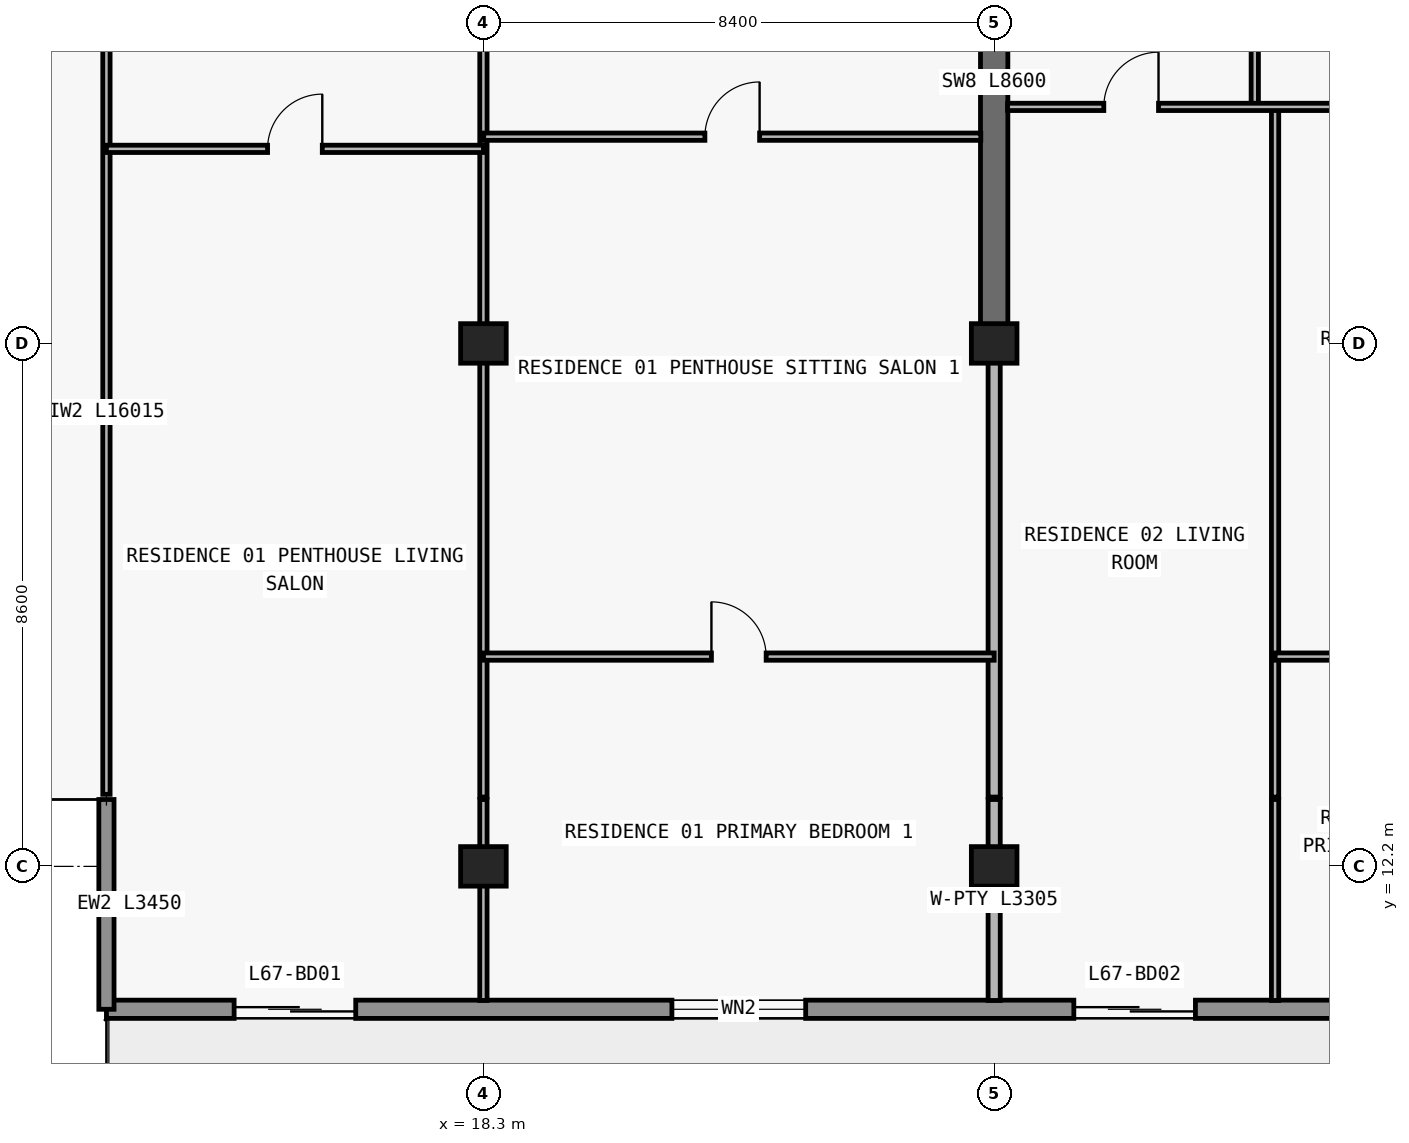
"""IFC4 building model, lengths in metres.
Left out: names, types, materials, properties, quantities, classifications, styles, units other than length and angle.
Written with IfcOpenShell. Run it as: python <this file> out.ifc"""

import sys

from ifc_helpers import new_model, si_unit, direction, frame, frame_2d, origin, origin_2d, place, context, subcontext, project, spatial, rectangle, extrude, element, fill, save


model = new_model("IFC4")
c1 = context("Model", 3, precision=1e-05, world=origin(), true_north=direction((0.0, 1.0)))
c2 = subcontext(c1, "Body", "Model", "MODEL_VIEW")
j1 = project(units=[si_unit("LENGTHUNIT", "METRE"), si_unit("PLANEANGLEUNIT", "RADIAN")], contexts=[c1])
p1 = place(None, origin())
s1 = spatial("IfcSite", under=j1, at=p1, CompositionType="ELEMENT")
p2 = place(p1, origin())
s2 = spatial("IfcBuilding", under=s1, at=p2, CompositionType="ELEMENT")
p3 = place(p2, frame((0.0, 0.0, 239.7)))
s3 = spatial("IfcBuildingStorey", under=s2, at=p3, CompositionType="ELEMENT", Elevation=239.7)
for number, where, z_axis, x_axis in (
    (1, (18.3, 12.2, 0.0), (0.0, 0.0, 1.0), (1.0, 0.0, 0.0)),
    (2, (26.7, 12.2, 0.0), (0.0, 0.0, 1.0), (1.0, 0.0, 0.0)),
    (3, (18.3, 20.8, 0.0), (0.0, 0.0, 1.0), (1.0, 0.0, 0.0)),
    (4, (26.7, 20.8, 0.0), (0.0, 0.0, 1.0), (1.0, 0.0, 0.0)),
):
    element("IfcColumn", number, at=place(p3, frame(where, z_axis=z_axis, x_axis=x_axis)), inside=s3, PredefinedType="COLUMN", context=c2, shape_type="SweptSolid", body=[
        extrude(rectangle(XDim=0.75, YDim=0.65, at=origin_2d()), origin(), (0.0, 0.0, 1.0), 3.05),
    ])
p4 = place(p3, frame((26.7, 20.8, 0.0), z_axis=(0.0, 0.0, 1.0), x_axis=(0.0, 1.0, 0.0)))
e5 = element("IfcWall", 5, at=p4, inside=s3, PredefinedType="SHEAR", context=c2, shape_type="SweptSolid", body=[
    extrude(rectangle(XDim=8.6, YDim=0.45, at=frame_2d((4.3, 0.0))), origin(), (0.0, 0.0, 1.0), 3.05),
])
p5 = place(p3, frame((65.7, 9.85, 0.0), z_axis=(0.0, 0.0, 1.0), x_axis=(-1.0, 0.0, 0.0)))
e6 = element("IfcWall", 6, at=p5, inside=s3, PredefinedType="STANDARD", context=c2, shape_type="SweptSolid", body=[
    extrude(rectangle(XDim=53.6, YDim=0.3, at=frame_2d((26.8, 0.0))), origin(), (0.0, 0.0, 1.0), 3.05),
])
p6 = place(p5, frame((49.5, 0.0, 0.0)))
e7 = element("IfcOpeningElement", 7, at=p6, cuts=e6, PredefinedType="OPENING", context=c2, shape_type="SweptSolid", body=[
    extrude(rectangle(XDim=2.0, YDim=2.3, at=frame_2d((1.0, 1.15))), frame((0.0, 0.16, 0.0), z_axis=(0.0, -1.0, 0.0), x_axis=(1.0, 0.0, 0.0)), (0.0, 0.0, 1.0), 0.32),
])
p7 = place(p5, frame((42.1, 0.0, 0.85)))
e8 = element("IfcOpeningElement", 8, at=p7, cuts=e6, PredefinedType="OPENING", context=c2, shape_type="SweptSolid", body=[
    extrude(rectangle(XDim=2.2, YDim=1.55, at=frame_2d((1.1, 0.775))), frame((0.0, 0.16, 0.0), z_axis=(0.0, -1.0, 0.0), x_axis=(1.0, 0.0, 0.0)), (0.0, 0.0, 1.0), 0.32),
])
p8 = place(p5, frame((35.69, 0.0, 0.0)))
e9 = element("IfcOpeningElement", 9, at=p8, cuts=e6, PredefinedType="OPENING", context=c2, shape_type="SweptSolid", body=[
    extrude(rectangle(XDim=2.0, YDim=2.3, at=frame_2d((1.0, 1.15))), frame((0.0, 0.16, 0.0), z_axis=(0.0, -1.0, 0.0), x_axis=(1.0, 0.0, 0.0)), (0.0, 0.0, 1.0), 0.32),
])
p9 = place(p5, frame((31.59, 0.0, 0.85)))
e10 = element("IfcOpeningElement", 10, at=p9, cuts=e6, PredefinedType="OPENING", context=c2, shape_type="SweptSolid", body=[
    extrude(rectangle(XDim=1.8, YDim=1.55, at=frame_2d((0.9, 0.775))), frame((0.0, 0.16, 0.0), z_axis=(0.0, -1.0, 0.0), x_axis=(1.0, 0.0, 0.0)), (0.0, 0.0, 1.0), 0.32),
])
p10 = place(p5, frame((23.914, 0.0, 0.85)))
e11 = element("IfcOpeningElement", 11, at=p10, cuts=e6, PredefinedType="OPENING", context=c2, shape_type="SweptSolid", body=[
    extrude(rectangle(XDim=2.2, YDim=1.55, at=frame_2d((1.1, 0.775))), frame((0.0, 0.16, 0.0), z_axis=(0.0, -1.0, 0.0), x_axis=(1.0, 0.0, 0.0)), (0.0, 0.0, 1.0), 0.32),
])
p11 = place(p5, frame((19.69, 0.0, 0.0)))
e12 = element("IfcOpeningElement", 12, at=p11, cuts=e6, PredefinedType="OPENING", context=c2, shape_type="SweptSolid", body=[
    extrude(rectangle(XDim=2.0, YDim=2.3, at=frame_2d((1.0, 1.15))), frame((0.0, 0.16, 0.0), z_axis=(0.0, -1.0, 0.0), x_axis=(1.0, 0.0, 0.0)), (0.0, 0.0, 1.0), 0.32),
])
p12 = place(p5, frame((15.59, 0.0, 0.85)))
e13 = element("IfcOpeningElement", 13, at=p12, cuts=e6, PredefinedType="OPENING", context=c2, shape_type="SweptSolid", body=[
    extrude(rectangle(XDim=1.8, YDim=1.55, at=frame_2d((0.9, 0.775))), frame((0.0, 0.16, 0.0), z_axis=(0.0, -1.0, 0.0), x_axis=(1.0, 0.0, 0.0)), (0.0, 0.0, 1.0), 0.32),
])
p13 = place(p5, frame((11.69, 0.0, 0.0)))
e14 = element("IfcOpeningElement", 14, at=p13, cuts=e6, PredefinedType="OPENING", context=c2, shape_type="SweptSolid", body=[
    extrude(rectangle(XDim=2.0, YDim=2.3, at=frame_2d((1.0, 1.15))), frame((0.0, 0.16, 0.0), z_axis=(0.0, -1.0, 0.0), x_axis=(1.0, 0.0, 0.0)), (0.0, 0.0, 1.0), 0.32),
])
p14 = place(p5, frame((7.01, 0.0, 0.65)))
e15 = element("IfcOpeningElement", 15, at=p14, cuts=e6, PredefinedType="OPENING", context=c2, shape_type="SweptSolid", body=[
    extrude(rectangle(XDim=2.6, YDim=1.85, at=frame_2d((1.3, 0.925))), frame((0.0, 0.16, 0.0), z_axis=(0.0, -1.0, 0.0), x_axis=(1.0, 0.0, 0.0)), (0.0, 0.0, 1.0), 0.32),
])
p15 = place(p5, frame((2.0, 0.0, 0.85)))
e16 = element("IfcOpeningElement", 16, at=p15, cuts=e6, PredefinedType="OPENING", context=c2, shape_type="SweptSolid", body=[
    extrude(rectangle(XDim=2.2, YDim=1.55, at=frame_2d((1.1, 0.775))), frame((0.0, 0.16, 0.0), z_axis=(0.0, -1.0, 0.0), x_axis=(1.0, 0.0, 0.0)), (0.0, 0.0, 1.0), 0.32),
])
p16 = place(p3, frame((12.1, 13.3, 0.0), z_axis=(0.0, 0.0, 1.0), x_axis=(0.0, -1.0, 0.0)))
e17 = element("IfcWall", 17, at=p16, inside=s3, PredefinedType="ELEMENTEDWALL", context=c2, shape_type="SweptSolid", body=[
    extrude(rectangle(XDim=3.45, YDim=0.25, at=frame_2d((1.725, 0.0))), origin(), (0.0, 0.0, 1.0), 3.05),
])
p17 = place(p3, frame((12.1, 13.385, 0.0), z_axis=(0.0, 0.0, 1.0), x_axis=(0.0, 1.0, 0.0)))
e18 = element("IfcWall", 18, at=p17, inside=s3, PredefinedType="PARTITIONING", context=c2, shape_type="SweptSolid", body=[
    extrude(rectangle(XDim=16.015, YDim=0.12, at=frame_2d((8.007, 0.0))), origin(), (0.0, 0.0, 1.0), 3.05),
])
p18 = place(p17, frame((12.565, 0.0, 0.0)))
e19 = element("IfcOpeningElement", 19, at=p18, cuts=e18, PredefinedType="OPENING", context=c2, shape_type="SweptSolid", body=[
    extrude(rectangle(XDim=0.9, YDim=2.15, at=frame_2d((0.45, 1.075))), frame((0.0, 0.07, 0.0), z_axis=(0.0, -1.0, 0.0), x_axis=(1.0, 0.0, 0.0)), (0.0, 0.0, 1.0), 0.14),
])
p19 = place(p3, frame((18.3, 9.995, 0.0), z_axis=(0.0, 0.0, 1.0), x_axis=(0.0, 1.0, 0.0)))
e20 = element("IfcWall", 20, at=p19, inside=s3, PredefinedType="PARTITIONING", context=c2, shape_type="SweptSolid", body=[
    extrude(rectangle(XDim=3.305, YDim=0.12, at=frame_2d((1.652, 0.0))), origin(), (0.0, 0.0, 1.0), 2.263),
])
p20 = place(p3, frame((18.3, 13.34, 0.0), z_axis=(0.0, 0.0, 1.0), x_axis=(0.0, 1.0, 0.0)))
e21 = element("IfcWall", 21, at=p20, inside=s3, PredefinedType="PARTITIONING", context=c2, shape_type="SweptSolid", body=[
    extrude(rectangle(XDim=16.06, YDim=0.12, at=frame_2d((8.03, 0.0))), origin(), (0.0, 0.0, 1.0), 2.263),
])
p21 = place(p20, frame((12.61, 0.0, 0.0)))
e22 = element("IfcOpeningElement", 22, at=p21, cuts=e21, PredefinedType="OPENING", context=c2, shape_type="SweptSolid", body=[
    extrude(rectangle(XDim=0.9, YDim=2.15, at=frame_2d((0.45, 1.075))), frame((0.0, 0.07, 0.0), z_axis=(0.0, -1.0, 0.0), x_axis=(1.0, 0.0, 0.0)), (0.0, 0.0, 1.0), 0.14),
])
p22 = place(p3, frame((26.7, 9.995, 0.0), z_axis=(0.0, 0.0, 1.0), x_axis=(0.0, 1.0, 0.0)))
e23 = element("IfcWall", 23, at=p22, inside=s3, PredefinedType="PARTITIONING", context=c2, shape_type="SweptSolid", body=[
    extrude(rectangle(XDim=3.305, YDim=0.2, at=frame_2d((1.652, 0.0))), origin(), (0.0, 0.0, 1.0), 2.263),
])
p23 = place(p3, frame((26.7, 13.34, 0.0), z_axis=(0.0, 0.0, 1.0), x_axis=(0.0, 1.0, 0.0)))
e24 = element("IfcWall", 24, at=p23, inside=s3, PredefinedType="PARTITIONING", context=c2, shape_type="SweptSolid", body=[
    extrude(rectangle(XDim=7.455, YDim=0.2, at=frame_2d((3.728, 0.0))), origin(), (0.0, 0.0, 1.0), 2.263),
])
p24 = place(p3, frame((30.986, 24.69, 0.0), z_axis=(0.0, 0.0, 1.0), x_axis=(0.0, 1.0, 0.0)))
e25 = element("IfcWall", 25, at=p24, inside=s3, PredefinedType="PARTITIONING", context=c2, shape_type="SweptSolid", body=[
    extrude(rectangle(XDim=4.71, YDim=0.12, at=frame_2d((2.355, 0.0))), origin(), (0.0, 0.0, 1.0), 2.629),
])
p25 = place(p24, frame((1.905, 0.0, 0.0)))
e26 = element("IfcOpeningElement", 26, at=p25, cuts=e25, PredefinedType="OPENING", context=c2, shape_type="SweptSolid", body=[
    extrude(rectangle(XDim=0.9, YDim=2.15, at=frame_2d((0.45, 1.075))), frame((0.0, 0.07, 0.0), z_axis=(0.0, -1.0, 0.0), x_axis=(1.0, 0.0, 0.0)), (0.0, 0.0, 1.0), 0.14),
])
p26 = place(p3, frame((31.32, 9.995, 0.0), z_axis=(0.0, 0.0, 1.0), x_axis=(0.0, 1.0, 0.0)))
e27 = element("IfcWall", 27, at=p26, inside=s3, PredefinedType="PARTITIONING", context=c2, shape_type="SweptSolid", body=[
    extrude(rectangle(XDim=3.305, YDim=0.12, at=frame_2d((1.652, 0.0))), origin(), (0.0, 0.0, 1.0), 3.05),
])
p27 = place(p3, frame((31.32, 13.34, 0.0), z_axis=(0.0, 0.0, 1.0), x_axis=(0.0, 1.0, 0.0)))
e28 = element("IfcWall", 28, at=p27, inside=s3, PredefinedType="PARTITIONING", context=c2, shape_type="SweptSolid", body=[
    extrude(rectangle(XDim=11.35, YDim=0.12, at=frame_2d((5.675, 0.0))), origin(), (0.0, 0.0, 1.0), 3.05),
])
p28 = place(p3, frame((18.3, 15.65, 0.0), z_axis=(0.0, 0.0, 1.0), x_axis=(1.0, 0.0, 0.0)))
e29 = element("IfcWall", 29, at=p28, inside=s3, PredefinedType="PARTITIONING", context=c2, shape_type="SweptSolid", body=[
    extrude(rectangle(XDim=8.4, YDim=0.12, at=frame_2d((4.2, 0.0))), origin(), (0.0, 0.0, 1.0), 3.05),
])
p29 = place(p28, frame((3.75, 0.0, 0.0)))
e30 = element("IfcOpeningElement", 30, at=p29, cuts=e29, PredefinedType="OPENING", context=c2, shape_type="SweptSolid", body=[
    extrude(rectangle(XDim=0.9, YDim=2.15, at=frame_2d((0.45, 1.075))), frame((0.0, 0.07, 0.0), z_axis=(0.0, -1.0, 0.0), x_axis=(1.0, 0.0, 0.0)), (0.0, 0.0, 1.0), 0.14),
])
p30 = place(p3, frame((31.32, 15.65, 0.0), z_axis=(0.0, 0.0, 1.0), x_axis=(1.0, 0.0, 0.0)))
e31 = element("IfcWall", 31, at=p30, inside=s3, PredefinedType="PARTITIONING", context=c2, shape_type="SweptSolid", body=[
    extrude(rectangle(XDim=3.78, YDim=0.12, at=frame_2d((1.89, 0.0))), origin(), (0.0, 0.0, 1.0), 3.05),
])
p31 = place(p30, frame((1.44, 0.0, 0.0)))
e32 = element("IfcOpeningElement", 32, at=p31, cuts=e31, PredefinedType="OPENING", context=c2, shape_type="SweptSolid", body=[
    extrude(rectangle(XDim=0.9, YDim=2.15, at=frame_2d((0.45, 1.075))), frame((0.0, 0.07, 0.0), z_axis=(0.0, -1.0, 0.0), x_axis=(1.0, 0.0, 0.0)), (0.0, 0.0, 1.0), 0.14),
])
p32 = place(p3, frame((12.1, 24.0, 0.0), z_axis=(0.0, 0.0, 1.0), x_axis=(1.0, 0.0, 0.0)))
e33 = element("IfcWall", 33, at=p32, inside=s3, PredefinedType="PARTITIONING", context=c2, shape_type="SweptSolid", body=[
    extrude(rectangle(XDim=6.2, YDim=0.12, at=frame_2d((3.1, 0.0))), origin(), (0.0, 0.0, 1.0), 3.05),
])
p33 = place(p32, frame((2.65, 0.0, 0.0)))
e34 = element("IfcOpeningElement", 34, at=p33, cuts=e33, PredefinedType="OPENING", context=c2, shape_type="SweptSolid", body=[
    extrude(rectangle(XDim=0.9, YDim=2.15, at=frame_2d((0.45, 1.075))), frame((0.0, 0.07, 0.0), z_axis=(0.0, -1.0, 0.0), x_axis=(1.0, 0.0, 0.0)), (0.0, 0.0, 1.0), 0.14),
])
p34 = place(p3, frame((18.305, 24.2, 0.0), z_axis=(0.0, 0.0, 1.0), x_axis=(1.0, 0.0, 0.0)))
e35 = element("IfcWall", 35, at=p34, inside=s3, PredefinedType="PARTITIONING", context=c2, shape_type="SweptSolid", body=[
    extrude(rectangle(XDim=8.175, YDim=0.12, at=frame_2d((4.087, 0.0))), origin(), (0.0, 0.0, 1.0), 3.05),
])
p35 = place(p34, frame((3.637, 0.0, 0.0)))
e36 = element("IfcOpeningElement", 36, at=p35, cuts=e35, PredefinedType="OPENING", context=c2, shape_type="SweptSolid", body=[
    extrude(rectangle(XDim=0.9, YDim=2.15, at=frame_2d((0.45, 1.075))), frame((0.0, 0.07, 0.0), z_axis=(0.0, -1.0, 0.0), x_axis=(1.0, 0.0, 0.0)), (0.0, 0.0, 1.0), 0.14),
])
p36 = place(p3, frame((26.92, 24.69, 0.0), z_axis=(0.0, 0.0, 1.0), x_axis=(1.0, 0.0, 0.0)))
e37 = element("IfcWall", 37, at=p36, inside=s3, PredefinedType="PARTITIONING", context=c2, shape_type="SweptSolid", body=[
    extrude(rectangle(XDim=8.18, YDim=0.12, at=frame_2d((4.09, 0.0))), origin(), (0.0, 0.0, 1.0), 3.05),
])
p37 = place(p36, frame((1.583, 0.0, 0.0)))
e38 = element("IfcOpeningElement", 38, at=p37, cuts=e37, PredefinedType="OPENING", context=c2, shape_type="SweptSolid", body=[
    extrude(rectangle(XDim=0.9, YDim=2.15, at=frame_2d((0.45, 1.075))), frame((0.0, 0.07, 0.0), z_axis=(0.0, -1.0, 0.0), x_axis=(1.0, 0.0, 0.0)), (0.0, 0.0, 1.0), 0.14),
])
p38 = place(p36, frame((5.84, 0.0, 0.0)))
e39 = element("IfcOpeningElement", 39, at=p38, cuts=e37, PredefinedType="OPENING", context=c2, shape_type="SweptSolid", body=[
    extrude(rectangle(XDim=0.9, YDim=2.15, at=frame_2d((0.45, 1.075))), frame((0.0, 0.07, 0.0), z_axis=(0.0, -1.0, 0.0), x_axis=(1.0, 0.0, 0.0)), (0.0, 0.0, 1.0), 0.14),
])
p39 = place(p6, origin())
e40 = element("IfcDoor", 40, at=p39, inside=s3, OperationType="DOUBLE_DOOR_SLIDING", PredefinedType="DOOR", context=c2, shape_type="SweptSolid", body=[
    extrude(rectangle(XDim=2.0, YDim=2.3, at=frame_2d((1.0, 1.15))), frame((0.0, 0.025, 0.0), z_axis=(0.0, -1.0, 0.0), x_axis=(1.0, 0.0, 0.0)), (0.0, 0.0, 1.0), 0.05),
])
fill(e7, e40)
p40 = place(p7, origin())
e41 = element("IfcWindow", 41, at=p40, inside=s3, PartitioningType="SINGLE_PANEL", PredefinedType="WINDOW", context=c2, shape_type="SweptSolid", body=[
    extrude(rectangle(XDim=2.2, YDim=1.55, at=frame_2d((1.1, 0.775))), frame((0.0, 0.03, 0.0), z_axis=(0.0, -1.0, 0.0), x_axis=(1.0, 0.0, 0.0)), (0.0, 0.0, 1.0), 0.06),
])
fill(e8, e41)
p41 = place(p8, origin())
e42 = element("IfcDoor", 42, at=p41, inside=s3, OperationType="DOUBLE_DOOR_SLIDING", PredefinedType="DOOR", context=c2, shape_type="SweptSolid", body=[
    extrude(rectangle(XDim=2.0, YDim=2.3, at=frame_2d((1.0, 1.15))), frame((0.0, 0.025, 0.0), z_axis=(0.0, -1.0, 0.0), x_axis=(1.0, 0.0, 0.0)), (0.0, 0.0, 1.0), 0.05),
])
fill(e9, e42)
p42 = place(p33, origin())
e43 = element("IfcDoor", 43, at=p42, inside=s3, OperationType="SINGLE_SWING_RIGHT", PredefinedType="DOOR", context=c2, shape_type="SweptSolid", body=[
    extrude(rectangle(XDim=0.9, YDim=2.15, at=frame_2d((0.45, 1.075))), frame((0.0, 0.025, 0.0), z_axis=(0.0, -1.0, 0.0), x_axis=(1.0, 0.0, 0.0)), (0.0, 0.0, 1.0), 0.05),
])
fill(e34, e43)
p43 = place(p35, origin())
e44 = element("IfcDoor", 44, at=p43, inside=s3, OperationType="SINGLE_SWING_RIGHT", PredefinedType="DOOR", context=c2, shape_type="SweptSolid", body=[
    extrude(rectangle(XDim=0.9, YDim=2.15, at=frame_2d((0.45, 1.075))), frame((0.0, 0.025, 0.0), z_axis=(0.0, -1.0, 0.0), x_axis=(1.0, 0.0, 0.0)), (0.0, 0.0, 1.0), 0.05),
])
fill(e36, e44)
p44 = place(p29, origin())
e45 = element("IfcDoor", 45, at=p44, inside=s3, OperationType="SINGLE_SWING_LEFT", PredefinedType="DOOR", context=c2, shape_type="SweptSolid", body=[
    extrude(rectangle(XDim=0.9, YDim=2.15, at=frame_2d((0.45, 1.075))), frame((0.0, 0.025, 0.0), z_axis=(0.0, -1.0, 0.0), x_axis=(1.0, 0.0, 0.0)), (0.0, 0.0, 1.0), 0.05),
])
fill(e30, e45)
p45 = place(p37, origin())
e46 = element("IfcDoor", 46, at=p45, inside=s3, OperationType="SINGLE_SWING_RIGHT", PredefinedType="DOOR", context=c2, shape_type="SweptSolid", body=[
    extrude(rectangle(XDim=0.9, YDim=2.15, at=frame_2d((0.45, 1.075))), frame((0.0, 0.025, 0.0), z_axis=(0.0, -1.0, 0.0), x_axis=(1.0, 0.0, 0.0)), (0.0, 0.0, 1.0), 0.05),
])
fill(e38, e46)
save(model, sys.argv[1])
